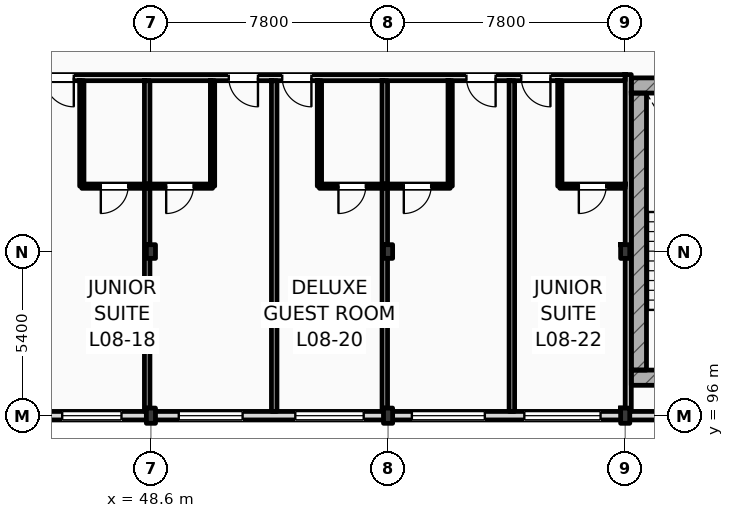
"""IFC4 building model, lengths in metres.
Left out: names, types, materials, properties, quantities, classifications, styles, units other than length and angle.
Written with IfcOpenShell. Run it as: python <this file> out.ifc"""

import sys

from ifc_helpers import new_model, si_unit, direction, frame, frame_2d, origin, origin_2d, place, context, subcontext, project, spatial, rectangle, i_section, extrude, element, fill, save


model = new_model("IFC4")
c1 = context("Model", 3, precision=1e-05, world=origin(), true_north=direction((0.0, 1.0)))
c2 = subcontext(c1, "Body", "Model", "MODEL_VIEW")
j1 = project(units=[si_unit("LENGTHUNIT", "METRE"), si_unit("PLANEANGLEUNIT", "RADIAN")], contexts=[c1])
p1 = place(None, origin())
s1 = spatial("IfcSite", under=j1, at=p1, CompositionType="ELEMENT")
p2 = place(p1, origin())
s2 = spatial("IfcBuilding", under=s1, at=p2, CompositionType="ELEMENT")
p3 = place(p2, frame((0.0, 0.0, 35.4)))
s3 = spatial("IfcBuildingStorey", under=s2, at=p3, CompositionType="ELEMENT", Elevation=35.4)
p4 = place(p3, frame((48.6, 96.0, 0.0), z_axis=(0.0, 0.0, 1.0), x_axis=(1.0, 0.0, 0.0)))
e1 = element("IfcColumn", 1, at=p4, inside=s3, PredefinedType="COLUMN", context=c2, shape_type="SweptSolid", body=[
    extrude(i_section(OverallWidth=0.3, OverallDepth=0.5, WebThickness=0.014, FlangeThickness=0.028, FilletRadius=0.027, at=origin_2d()), origin(), (0.0, 0.0, 1.0), 3.6),
])
p5 = place(p3, frame((48.6, 101.4, 0.0), z_axis=(0.0, 0.0, 1.0), x_axis=(1.0, 0.0, 0.0)))
e2 = element("IfcColumn", 2, at=p5, inside=s3, PredefinedType="COLUMN", context=c2, shape_type="SweptSolid", body=[
    extrude(i_section(OverallWidth=0.3, OverallDepth=0.45, WebThickness=0.014, FlangeThickness=0.026, FilletRadius=0.027, at=origin_2d()), origin(), (0.0, 0.0, 1.0), 3.6),
])
p6 = place(p3, frame((56.4, 96.0, 0.0), z_axis=(0.0, 0.0, 1.0), x_axis=(1.0, 0.0, 0.0)))
e3 = element("IfcColumn", 3, at=p6, inside=s3, PredefinedType="COLUMN", context=c2, shape_type="SweptSolid", body=[
    extrude(i_section(OverallWidth=0.3, OverallDepth=0.5, WebThickness=0.014, FlangeThickness=0.028, FilletRadius=0.027, at=origin_2d()), origin(), (0.0, 0.0, 1.0), 3.6),
])
p7 = place(p3, frame((56.4, 101.4, 0.0), z_axis=(0.0, 0.0, 1.0), x_axis=(1.0, 0.0, 0.0)))
e4 = element("IfcColumn", 4, at=p7, inside=s3, PredefinedType="COLUMN", context=c2, shape_type="SweptSolid", body=[
    extrude(i_section(OverallWidth=0.3, OverallDepth=0.45, WebThickness=0.014, FlangeThickness=0.026, FilletRadius=0.027, at=origin_2d()), origin(), (0.0, 0.0, 1.0), 3.6),
])
p8 = place(p3, frame((64.2, 96.0, 0.0), z_axis=(0.0, 0.0, 1.0), x_axis=(1.0, 0.0, 0.0)))
e5 = element("IfcColumn", 5, at=p8, inside=s3, PredefinedType="COLUMN", context=c2, shape_type="SweptSolid", body=[
    extrude(i_section(OverallWidth=0.3, OverallDepth=0.5, WebThickness=0.014, FlangeThickness=0.028, FilletRadius=0.027, at=origin_2d()), origin(), (0.0, 0.0, 1.0), 3.6),
])
p9 = place(p3, frame((64.2, 101.4, 0.0), z_axis=(0.0, 0.0, 1.0), x_axis=(1.0, 0.0, 0.0)))
e6 = element("IfcColumn", 6, at=p9, inside=s3, PredefinedType="COLUMN", context=c2, shape_type="SweptSolid", body=[
    extrude(i_section(OverallWidth=0.3, OverallDepth=0.45, WebThickness=0.014, FlangeThickness=0.026, FilletRadius=0.027, at=origin_2d()), origin(), (0.0, 0.0, 1.0), 3.6),
])
for number, where, z_axis, x_axis in (
    (7, (64.4, 106.862, 0.0), (0.0, 0.0, 1.0), (1.0, 0.0, 0.0)),
    (8, (64.4, 97.25, 0.0), (0.0, 0.0, 1.0), (1.0, 0.0, 0.0)),
):
    element("IfcWall", number, at=place(p3, frame(where, z_axis=z_axis, x_axis=x_axis)), inside=s3, PredefinedType="SHEAR", context=c2, shape_type="SweptSolid", body=[
        extrude(rectangle(XDim=5.16, YDim=0.5, at=frame_2d((2.58, 0.0))), origin(), (0.0, 0.0, 1.0), 3.6),
    ])
p10 = place(p3, frame((64.65, 97.5, 0.0), z_axis=(0.0, 0.0, 1.0), x_axis=(0.0, 1.0, 0.0)))
e9 = element("IfcWall", 9, at=p10, inside=s3, PredefinedType="SHEAR", context=c2, shape_type="SweptSolid", body=[
    extrude(rectangle(XDim=9.112, YDim=0.5, at=frame_2d((4.556, 0.0))), origin(), (0.0, 0.0, 1.0), 3.6),
])
p11 = place(p3, frame((25.2, 96.0, 0.0), z_axis=(0.0, 0.0, 1.0), x_axis=(1.0, 0.0, 0.0)))
e10 = element("IfcWall", 10, at=p11, inside=s3, PredefinedType="STANDARD", context=c2, shape_type="SweptSolid", body=[
    extrude(rectangle(XDim=70.2, YDim=0.28, at=frame_2d((35.1, 0.0))), origin(), (0.0, 0.0, 1.0), 2.92),
])
p12 = place(p11, frame((16.694, 0.0, 0.9)))
e11 = element("IfcOpeningElement", 11, at=p12, cuts=e10, PredefinedType="OPENING", context=c2, shape_type="SweptSolid", body=[
    extrude(rectangle(XDim=1.8, YDim=1.84, at=frame_2d((0.9, 0.92))), frame((0.0, 0.15, 0.0), z_axis=(0.0, -1.0, 0.0), x_axis=(1.0, 0.0, 0.0)), (0.0, 0.0, 1.0), 0.3),
])
p13 = place(p11, frame((20.482, 0.0, 0.9)))
e12 = element("IfcOpeningElement", 12, at=p13, cuts=e10, PredefinedType="OPENING", context=c2, shape_type="SweptSolid", body=[
    extrude(rectangle(XDim=1.95, YDim=1.84, at=frame_2d((0.975, 0.92))), frame((0.0, 0.15, 0.0), z_axis=(0.0, -1.0, 0.0), x_axis=(1.0, 0.0, 0.0)), (0.0, 0.0, 1.0), 0.3),
])
p14 = place(p11, frame((24.316, 0.0, 0.9)))
e13 = element("IfcOpeningElement", 13, at=p14, cuts=e10, PredefinedType="OPENING", context=c2, shape_type="SweptSolid", body=[
    extrude(rectangle(XDim=2.1, YDim=1.84, at=frame_2d((1.05, 0.92))), frame((0.0, 0.15, 0.0), z_axis=(0.0, -1.0, 0.0), x_axis=(1.0, 0.0, 0.0)), (0.0, 0.0, 1.0), 0.3),
])
p15 = place(p11, frame((28.149, 0.0, 0.9)))
e14 = element("IfcOpeningElement", 14, at=p15, cuts=e10, PredefinedType="OPENING", context=c2, shape_type="SweptSolid", body=[
    extrude(rectangle(XDim=2.25, YDim=1.84, at=frame_2d((1.125, 0.92))), frame((0.0, 0.15, 0.0), z_axis=(0.0, -1.0, 0.0), x_axis=(1.0, 0.0, 0.0)), (0.0, 0.0, 1.0), 0.3),
])
p16 = place(p11, frame((31.983, 0.0, 0.9)))
e15 = element("IfcOpeningElement", 15, at=p16, cuts=e10, PredefinedType="OPENING", context=c2, shape_type="SweptSolid", body=[
    extrude(rectangle(XDim=2.4, YDim=1.84, at=frame_2d((1.2, 0.92))), frame((0.0, 0.15, 0.0), z_axis=(0.0, -1.0, 0.0), x_axis=(1.0, 0.0, 0.0)), (0.0, 0.0, 1.0), 0.3),
])
p17 = place(p11, frame((35.682, 0.0, 0.9)))
e16 = element("IfcOpeningElement", 16, at=p17, cuts=e10, PredefinedType="OPENING", context=c2, shape_type="SweptSolid", body=[
    extrude(rectangle(XDim=2.508, YDim=1.84, at=frame_2d((1.254, 0.92))), frame((0.0, 0.15, 0.0), z_axis=(0.0, -1.0, 0.0), x_axis=(1.0, 0.0, 0.0)), (0.0, 0.0, 1.0), 0.3),
])
p18 = place(p11, frame((55.56, 0.0, 0.9)))
e17 = element("IfcOpeningElement", 17, at=p18, cuts=e10, PredefinedType="OPENING", context=c2, shape_type="SweptSolid", body=[
    extrude(rectangle(XDim=1.8, YDim=1.84, at=frame_2d((0.9, 0.92))), frame((0.0, 0.15, 0.0), z_axis=(0.0, -1.0, 0.0), x_axis=(1.0, 0.0, 0.0)), (0.0, 0.0, 1.0), 0.3),
])
p19 = place(p11, frame((58.628, 0.0, 0.9)))
e18 = element("IfcOpeningElement", 18, at=p19, cuts=e10, PredefinedType="OPENING", context=c2, shape_type="SweptSolid", body=[
    extrude(rectangle(XDim=2.809, YDim=1.84, at=frame_2d((1.405, 0.92))), frame((0.0, 0.15, 0.0), z_axis=(0.0, -1.0, 0.0), x_axis=(1.0, 0.0, 0.0)), (0.0, 0.0, 1.0), 0.3),
])
p20 = place(p11, frame((63.257, 0.0, 0.9)))
e19 = element("IfcOpeningElement", 19, at=p20, cuts=e10, PredefinedType="OPENING", context=c2, shape_type="SweptSolid", body=[
    extrude(rectangle(XDim=1.8, YDim=1.84, at=frame_2d((0.9, 0.92))), frame((0.0, 0.15, 0.0), z_axis=(0.0, -1.0, 0.0), x_axis=(1.0, 0.0, 0.0)), (0.0, 0.0, 1.0), 0.3),
])
p21 = place(p11, frame((66.453, 0.0, 0.9)))
e20 = element("IfcOpeningElement", 20, at=p21, cuts=e10, PredefinedType="OPENING", context=c2, shape_type="SweptSolid", body=[
    extrude(rectangle(XDim=2.737, YDim=1.84, at=frame_2d((1.369, 0.92))), frame((0.0, 0.15, 0.0), z_axis=(0.0, -1.0, 0.0), x_axis=(1.0, 0.0, 0.0)), (0.0, 0.0, 1.0), 0.3),
])
p22 = place(p3, frame((40.76, 107.12, 0.0), z_axis=(0.0, 0.0, 1.0), x_axis=(1.0, 0.0, 0.0)))
e21 = element("IfcWall", 21, at=p22, inside=s3, PredefinedType="PARTITIONING", context=c2, shape_type="SweptSolid", body=[
    extrude(rectangle(XDim=23.44, YDim=0.2, at=frame_2d((11.72, 0.0))), origin(), (0.0, 0.0, 1.0), 3.38),
])
p23 = place(p22, frame((2.629, 0.0, 0.0)))
e22 = element("IfcOpeningElement", 22, at=p23, cuts=e21, PredefinedType="OPENING", context=c2, shape_type="SweptSolid", body=[
    extrude(rectangle(XDim=0.96, YDim=2.2, at=frame_2d((0.48, 1.1))), frame((0.0, 0.11, 0.0), z_axis=(0.0, -1.0, 0.0), x_axis=(1.0, 0.0, 0.0)), (0.0, 0.0, 1.0), 0.22),
])
p24 = place(p22, frame((4.343, 0.0, 0.0)))
e23 = element("IfcOpeningElement", 23, at=p24, cuts=e21, PredefinedType="OPENING", context=c2, shape_type="SweptSolid", body=[
    extrude(rectangle(XDim=0.96, YDim=2.2, at=frame_2d((0.48, 1.1))), frame((0.0, 0.11, 0.0), z_axis=(0.0, -1.0, 0.0), x_axis=(1.0, 0.0, 0.0)), (0.0, 0.0, 1.0), 0.22),
])
p25 = place(p22, frame((10.401, 0.0, 0.0)))
e24 = element("IfcOpeningElement", 24, at=p25, cuts=e21, PredefinedType="OPENING", context=c2, shape_type="SweptSolid", body=[
    extrude(rectangle(XDim=0.96, YDim=2.2, at=frame_2d((0.48, 1.1))), frame((0.0, 0.11, 0.0), z_axis=(0.0, -1.0, 0.0), x_axis=(1.0, 0.0, 0.0)), (0.0, 0.0, 1.0), 0.22),
])
p26 = place(p22, frame((12.159, 0.0, 0.0)))
e25 = element("IfcOpeningElement", 25, at=p26, cuts=e21, PredefinedType="OPENING", context=c2, shape_type="SweptSolid", body=[
    extrude(rectangle(XDim=0.96, YDim=2.2, at=frame_2d((0.48, 1.1))), frame((0.0, 0.11, 0.0), z_axis=(0.0, -1.0, 0.0), x_axis=(1.0, 0.0, 0.0)), (0.0, 0.0, 1.0), 0.22),
])
p27 = place(p22, frame((18.218, 0.0, 0.0)))
e26 = element("IfcOpeningElement", 26, at=p27, cuts=e21, PredefinedType="OPENING", context=c2, shape_type="SweptSolid", body=[
    extrude(rectangle(XDim=0.96, YDim=2.2, at=frame_2d((0.48, 1.1))), frame((0.0, 0.11, 0.0), z_axis=(0.0, -1.0, 0.0), x_axis=(1.0, 0.0, 0.0)), (0.0, 0.0, 1.0), 0.22),
])
p28 = place(p22, frame((20.021, 0.0, 0.0)))
e27 = element("IfcOpeningElement", 27, at=p28, cuts=e21, PredefinedType="OPENING", context=c2, shape_type="SweptSolid", body=[
    extrude(rectangle(XDim=0.96, YDim=2.2, at=frame_2d((0.48, 1.1))), frame((0.0, 0.11, 0.0), z_axis=(0.0, -1.0, 0.0), x_axis=(1.0, 0.0, 0.0)), (0.0, 0.0, 1.0), 0.22),
])
p29 = place(p3, frame((64.3, 96.14, 0.0), z_axis=(0.0, 0.0, 1.0), x_axis=(0.0, 1.0, 0.0)))
e28 = element("IfcWall", 28, at=p29, inside=s3, PredefinedType="PARTITIONING", context=c2, shape_type="SweptSolid", body=[
    extrude(rectangle(XDim=11.08, YDim=0.2, at=frame_2d((5.54, 0.0))), origin(), (0.0, 0.0, 1.0), 3.01),
])
p30 = place(p3, frame((48.477, 96.14, 0.0), z_axis=(0.0, 0.0, 1.0), x_axis=(0.0, 1.0, 0.0)))
e29 = element("IfcWall", 29, at=p30, inside=s3, PredefinedType="PARTITIONING", context=c2, shape_type="SweptSolid", body=[
    extrude(rectangle(XDim=10.88, YDim=0.18, at=frame_2d((5.44, 0.0))), origin(), (0.0, 0.0, 1.0), 3.01),
])
p31 = place(p3, frame((46.327, 103.55, 0.0), z_axis=(0.0, 0.0, 1.0), x_axis=(0.0, 1.0, 0.0)))
e30 = element("IfcWall", 30, at=p31, inside=s3, PredefinedType="PARTITIONING", context=c2, shape_type="SweptSolid", body=[
    extrude(rectangle(XDim=3.47, YDim=0.14, at=frame_2d((1.735, 0.0))), origin(), (0.0, 0.0, 1.0), 3.38),
])
p32 = place(p3, frame((46.327, 103.55, 0.0), z_axis=(0.0, 0.0, 1.0), x_axis=(1.0, 0.0, 0.0)))
e31 = element("IfcWall", 31, at=p32, inside=s3, PredefinedType="PARTITIONING", context=c2, shape_type="SweptSolid", body=[
    extrude(rectangle(XDim=2.15, YDim=0.14, at=frame_2d((1.075, 0.0))), origin(), (0.0, 0.0, 1.0), 3.38),
])
p33 = place(p32, frame((0.625, 0.0, 0.0)))
e32 = element("IfcOpeningElement", 32, at=p33, cuts=e31, PredefinedType="OPENING", context=c2, shape_type="SweptSolid", body=[
    extrude(rectangle(XDim=0.9, YDim=2.1, at=frame_2d((0.45, 1.05))), frame((0.0, 0.08, 0.0), z_axis=(0.0, -1.0, 0.0), x_axis=(1.0, 0.0, 0.0)), (0.0, 0.0, 1.0), 0.16),
])
p34 = place(p3, frame((52.655, 96.14, 0.0), z_axis=(0.0, 0.0, 1.0), x_axis=(0.0, 1.0, 0.0)))
e33 = element("IfcWall", 33, at=p34, inside=s3, PredefinedType="PARTITIONING", context=c2, shape_type="SweptSolid", body=[
    extrude(rectangle(XDim=10.88, YDim=0.18, at=frame_2d((5.44, 0.0))), origin(), (0.0, 0.0, 1.0), 3.38),
])
p35 = place(p3, frame((50.627, 103.55, 0.0), z_axis=(0.0, 0.0, 1.0), x_axis=(0.0, 1.0, 0.0)))
e34 = element("IfcWall", 34, at=p35, inside=s3, PredefinedType="PARTITIONING", context=c2, shape_type="SweptSolid", body=[
    extrude(rectangle(XDim=3.47, YDim=0.14, at=frame_2d((1.735, 0.0))), origin(), (0.0, 0.0, 1.0), 3.38),
])
p36 = place(p3, frame((48.477, 103.55, 0.0), z_axis=(0.0, 0.0, 1.0), x_axis=(1.0, 0.0, 0.0)))
e35 = element("IfcWall", 35, at=p36, inside=s3, PredefinedType="PARTITIONING", context=c2, shape_type="SweptSolid", body=[
    extrude(rectangle(XDim=2.15, YDim=0.14, at=frame_2d((1.075, 0.0))), origin(), (0.0, 0.0, 1.0), 3.38),
])
p37 = place(p36, frame((0.625, 0.0, 0.0)))
e36 = element("IfcOpeningElement", 36, at=p37, cuts=e35, PredefinedType="OPENING", context=c2, shape_type="SweptSolid", body=[
    extrude(rectangle(XDim=0.9, YDim=2.1, at=frame_2d((0.45, 1.05))), frame((0.0, 0.08, 0.0), z_axis=(0.0, -1.0, 0.0), x_axis=(1.0, 0.0, 0.0)), (0.0, 0.0, 1.0), 0.16),
])
p38 = place(p3, frame((56.293, 96.14, 0.0), z_axis=(0.0, 0.0, 1.0), x_axis=(0.0, 1.0, 0.0)))
e37 = element("IfcWall", 37, at=p38, inside=s3, PredefinedType="PARTITIONING", context=c2, shape_type="SweptSolid", body=[
    extrude(rectangle(XDim=10.88, YDim=0.18, at=frame_2d((5.44, 0.0))), origin(), (0.0, 0.0, 1.0), 3.01),
])
p39 = place(p3, frame((54.143, 103.55, 0.0), z_axis=(0.0, 0.0, 1.0), x_axis=(0.0, 1.0, 0.0)))
e38 = element("IfcWall", 38, at=p39, inside=s3, PredefinedType="PARTITIONING", context=c2, shape_type="SweptSolid", body=[
    extrude(rectangle(XDim=3.47, YDim=0.14, at=frame_2d((1.735, 0.0))), origin(), (0.0, 0.0, 1.0), 3.38),
])
p40 = place(p3, frame((54.143, 103.55, 0.0), z_axis=(0.0, 0.0, 1.0), x_axis=(1.0, 0.0, 0.0)))
e39 = element("IfcWall", 39, at=p40, inside=s3, PredefinedType="PARTITIONING", context=c2, shape_type="SweptSolid", body=[
    extrude(rectangle(XDim=2.15, YDim=0.14, at=frame_2d((1.075, 0.0))), origin(), (0.0, 0.0, 1.0), 3.38),
])
p41 = place(p40, frame((0.625, 0.0, 0.0)))
e40 = element("IfcOpeningElement", 40, at=p41, cuts=e39, PredefinedType="OPENING", context=c2, shape_type="SweptSolid", body=[
    extrude(rectangle(XDim=0.9, YDim=2.1, at=frame_2d((0.45, 1.05))), frame((0.0, 0.08, 0.0), z_axis=(0.0, -1.0, 0.0), x_axis=(1.0, 0.0, 0.0)), (0.0, 0.0, 1.0), 0.16),
])
p42 = place(p3, frame((60.472, 96.14, 0.0), z_axis=(0.0, 0.0, 1.0), x_axis=(0.0, 1.0, 0.0)))
e41 = element("IfcWall", 41, at=p42, inside=s3, PredefinedType="PARTITIONING", context=c2, shape_type="SweptSolid", body=[
    extrude(rectangle(XDim=10.88, YDim=0.18, at=frame_2d((5.44, 0.0))), origin(), (0.0, 0.0, 1.0), 3.38),
])
p43 = place(p3, frame((58.443, 103.55, 0.0), z_axis=(0.0, 0.0, 1.0), x_axis=(0.0, 1.0, 0.0)))
e42 = element("IfcWall", 42, at=p43, inside=s3, PredefinedType="PARTITIONING", context=c2, shape_type="SweptSolid", body=[
    extrude(rectangle(XDim=3.47, YDim=0.14, at=frame_2d((1.735, 0.0))), origin(), (0.0, 0.0, 1.0), 3.38),
])
p44 = place(p3, frame((56.293, 103.55, 0.0), z_axis=(0.0, 0.0, 1.0), x_axis=(1.0, 0.0, 0.0)))
e43 = element("IfcWall", 43, at=p44, inside=s3, PredefinedType="PARTITIONING", context=c2, shape_type="SweptSolid", body=[
    extrude(rectangle(XDim=2.15, YDim=0.14, at=frame_2d((1.075, 0.0))), origin(), (0.0, 0.0, 1.0), 3.38),
])
p45 = place(p44, frame((0.625, 0.0, 0.0)))
e44 = element("IfcOpeningElement", 44, at=p45, cuts=e43, PredefinedType="OPENING", context=c2, shape_type="SweptSolid", body=[
    extrude(rectangle(XDim=0.9, YDim=2.1, at=frame_2d((0.45, 1.05))), frame((0.0, 0.08, 0.0), z_axis=(0.0, -1.0, 0.0), x_axis=(1.0, 0.0, 0.0)), (0.0, 0.0, 1.0), 0.16),
])
p46 = place(p3, frame((62.05, 103.55, 0.0), z_axis=(0.0, 0.0, 1.0), x_axis=(0.0, 1.0, 0.0)))
e45 = element("IfcWall", 45, at=p46, inside=s3, PredefinedType="PARTITIONING", context=c2, shape_type="SweptSolid", body=[
    extrude(rectangle(XDim=3.47, YDim=0.14, at=frame_2d((1.735, 0.0))), origin(), (0.0, 0.0, 1.0), 3.38),
])
p47 = place(p3, frame((62.05, 103.55, 0.0), z_axis=(0.0, 0.0, 1.0), x_axis=(1.0, 0.0, 0.0)))
e46 = element("IfcWall", 46, at=p47, inside=s3, PredefinedType="PARTITIONING", context=c2, shape_type="SweptSolid", body=[
    extrude(rectangle(XDim=2.15, YDim=0.14, at=frame_2d((1.075, 0.0))), origin(), (0.0, 0.0, 1.0), 3.38),
])
p48 = place(p47, frame((0.625, 0.0, 0.0)))
e47 = element("IfcOpeningElement", 47, at=p48, cuts=e46, PredefinedType="OPENING", context=c2, shape_type="SweptSolid", body=[
    extrude(rectangle(XDim=0.9, YDim=2.1, at=frame_2d((0.45, 1.05))), frame((0.0, 0.08, 0.0), z_axis=(0.0, -1.0, 0.0), x_axis=(1.0, 0.0, 0.0)), (0.0, 0.0, 1.0), 0.16),
])
p49 = place(p13, origin())
e48 = element("IfcWindow", 48, at=p49, inside=s3, PartitioningType="DOUBLE_PANEL_VERTICAL", PredefinedType="WINDOW", context=c2, shape_type="SweptSolid", body=[
    extrude(rectangle(XDim=1.95, YDim=1.84, at=frame_2d((0.975, 0.92))), frame((0.0, 0.03, 0.0), z_axis=(0.0, -1.0, 0.0), x_axis=(1.0, 0.0, 0.0)), (0.0, 0.0, 1.0), 0.06),
])
fill(e12, e48)
p50 = place(p14, origin())
e49 = element("IfcWindow", 49, at=p50, inside=s3, PartitioningType="DOUBLE_PANEL_VERTICAL", PredefinedType="WINDOW", context=c2, shape_type="SweptSolid", body=[
    extrude(rectangle(XDim=2.1, YDim=1.84, at=frame_2d((1.05, 0.92))), frame((0.0, 0.03, 0.0), z_axis=(0.0, -1.0, 0.0), x_axis=(1.0, 0.0, 0.0)), (0.0, 0.0, 1.0), 0.06),
])
fill(e13, e49)
p51 = place(p15, origin())
e50 = element("IfcWindow", 50, at=p51, inside=s3, PartitioningType="DOUBLE_PANEL_VERTICAL", PredefinedType="WINDOW", context=c2, shape_type="SweptSolid", body=[
    extrude(rectangle(XDim=2.25, YDim=1.84, at=frame_2d((1.125, 0.92))), frame((0.0, 0.03, 0.0), z_axis=(0.0, -1.0, 0.0), x_axis=(1.0, 0.0, 0.0)), (0.0, 0.0, 1.0), 0.06),
])
fill(e14, e50)
p52 = place(p16, origin())
e51 = element("IfcWindow", 51, at=p52, inside=s3, PartitioningType="DOUBLE_PANEL_VERTICAL", PredefinedType="WINDOW", context=c2, shape_type="SweptSolid", body=[
    extrude(rectangle(XDim=2.4, YDim=1.84, at=frame_2d((1.2, 0.92))), frame((0.0, 0.03, 0.0), z_axis=(0.0, -1.0, 0.0), x_axis=(1.0, 0.0, 0.0)), (0.0, 0.0, 1.0), 0.06),
])
fill(e15, e51)
p53 = place(p17, origin())
e52 = element("IfcWindow", 52, at=p53, inside=s3, PartitioningType="DOUBLE_PANEL_VERTICAL", PredefinedType="WINDOW", context=c2, shape_type="SweptSolid", body=[
    extrude(rectangle(XDim=2.508, YDim=1.84, at=frame_2d((1.254, 0.92))), frame((0.0, 0.03, 0.0), z_axis=(0.0, -1.0, 0.0), x_axis=(1.0, 0.0, 0.0)), (0.0, 0.0, 1.0), 0.06),
])
fill(e16, e52)
p54 = place(p24, frame((0.96, 0.0, 0.0), z_axis=(0.0, 0.0, 1.0), x_axis=(-1.0, 0.0, 0.0)))
e53 = element("IfcDoor", 53, at=p54, inside=s3, OperationType="SINGLE_SWING_RIGHT", PredefinedType="DOOR", context=c2, shape_type="SweptSolid", body=[
    extrude(rectangle(XDim=0.96, YDim=2.2, at=frame_2d((0.48, 1.1))), frame((0.0, 0.025, 0.0), z_axis=(0.0, -1.0, 0.0), x_axis=(1.0, 0.0, 0.0)), (0.0, 0.0, 1.0), 0.05),
])
fill(e23, e53)
p55 = place(p33, frame((0.9, 0.0, 0.0), z_axis=(0.0, 0.0, 1.0), x_axis=(-1.0, 0.0, 0.0)))
e54 = element("IfcDoor", 54, at=p55, inside=s3, OperationType="SINGLE_SWING_LEFT", PredefinedType="DOOR", context=c2, shape_type="SweptSolid", body=[
    extrude(rectangle(XDim=0.9, YDim=2.1, at=frame_2d((0.45, 1.05))), frame((0.0, 0.025, 0.0), z_axis=(0.0, -1.0, 0.0), x_axis=(1.0, 0.0, 0.0)), (0.0, 0.0, 1.0), 0.05),
])
fill(e32, e54)
p56 = place(p25, frame((0.96, 0.0, 0.0), z_axis=(0.0, 0.0, 1.0), x_axis=(-1.0, 0.0, 0.0)))
e55 = element("IfcDoor", 55, at=p56, inside=s3, OperationType="SINGLE_SWING_RIGHT", PredefinedType="DOOR", context=c2, shape_type="SweptSolid", body=[
    extrude(rectangle(XDim=0.96, YDim=2.2, at=frame_2d((0.48, 1.1))), frame((0.0, 0.025, 0.0), z_axis=(0.0, -1.0, 0.0), x_axis=(1.0, 0.0, 0.0)), (0.0, 0.0, 1.0), 0.05),
])
fill(e24, e55)
p57 = place(p37, frame((0.9, 0.0, 0.0), z_axis=(0.0, 0.0, 1.0), x_axis=(-1.0, 0.0, 0.0)))
e56 = element("IfcDoor", 56, at=p57, inside=s3, OperationType="SINGLE_SWING_LEFT", PredefinedType="DOOR", context=c2, shape_type="SweptSolid", body=[
    extrude(rectangle(XDim=0.9, YDim=2.1, at=frame_2d((0.45, 1.05))), frame((0.0, 0.025, 0.0), z_axis=(0.0, -1.0, 0.0), x_axis=(1.0, 0.0, 0.0)), (0.0, 0.0, 1.0), 0.05),
])
fill(e36, e56)
p58 = place(p26, frame((0.96, 0.0, 0.0), z_axis=(0.0, 0.0, 1.0), x_axis=(-1.0, 0.0, 0.0)))
e57 = element("IfcDoor", 57, at=p58, inside=s3, OperationType="SINGLE_SWING_RIGHT", PredefinedType="DOOR", context=c2, shape_type="SweptSolid", body=[
    extrude(rectangle(XDim=0.96, YDim=2.2, at=frame_2d((0.48, 1.1))), frame((0.0, 0.025, 0.0), z_axis=(0.0, -1.0, 0.0), x_axis=(1.0, 0.0, 0.0)), (0.0, 0.0, 1.0), 0.05),
])
fill(e25, e57)
p59 = place(p41, frame((0.9, 0.0, 0.0), z_axis=(0.0, 0.0, 1.0), x_axis=(-1.0, 0.0, 0.0)))
e58 = element("IfcDoor", 58, at=p59, inside=s3, OperationType="SINGLE_SWING_LEFT", PredefinedType="DOOR", context=c2, shape_type="SweptSolid", body=[
    extrude(rectangle(XDim=0.9, YDim=2.1, at=frame_2d((0.45, 1.05))), frame((0.0, 0.025, 0.0), z_axis=(0.0, -1.0, 0.0), x_axis=(1.0, 0.0, 0.0)), (0.0, 0.0, 1.0), 0.05),
])
fill(e40, e58)
p60 = place(p27, frame((0.96, 0.0, 0.0), z_axis=(0.0, 0.0, 1.0), x_axis=(-1.0, 0.0, 0.0)))
e59 = element("IfcDoor", 59, at=p60, inside=s3, OperationType="SINGLE_SWING_RIGHT", PredefinedType="DOOR", context=c2, shape_type="SweptSolid", body=[
    extrude(rectangle(XDim=0.96, YDim=2.2, at=frame_2d((0.48, 1.1))), frame((0.0, 0.025, 0.0), z_axis=(0.0, -1.0, 0.0), x_axis=(1.0, 0.0, 0.0)), (0.0, 0.0, 1.0), 0.05),
])
fill(e26, e59)
p61 = place(p45, frame((0.9, 0.0, 0.0), z_axis=(0.0, 0.0, 1.0), x_axis=(-1.0, 0.0, 0.0)))
e60 = element("IfcDoor", 60, at=p61, inside=s3, OperationType="SINGLE_SWING_LEFT", PredefinedType="DOOR", context=c2, shape_type="SweptSolid", body=[
    extrude(rectangle(XDim=0.9, YDim=2.1, at=frame_2d((0.45, 1.05))), frame((0.0, 0.025, 0.0), z_axis=(0.0, -1.0, 0.0), x_axis=(1.0, 0.0, 0.0)), (0.0, 0.0, 1.0), 0.05),
])
fill(e44, e60)
p62 = place(p28, frame((0.96, 0.0, 0.0), z_axis=(0.0, 0.0, 1.0), x_axis=(-1.0, 0.0, 0.0)))
e61 = element("IfcDoor", 61, at=p62, inside=s3, OperationType="SINGLE_SWING_RIGHT", PredefinedType="DOOR", context=c2, shape_type="SweptSolid", body=[
    extrude(rectangle(XDim=0.96, YDim=2.2, at=frame_2d((0.48, 1.1))), frame((0.0, 0.025, 0.0), z_axis=(0.0, -1.0, 0.0), x_axis=(1.0, 0.0, 0.0)), (0.0, 0.0, 1.0), 0.05),
])
fill(e27, e61)
p63 = place(p48, frame((0.9, 0.0, 0.0), z_axis=(0.0, 0.0, 1.0), x_axis=(-1.0, 0.0, 0.0)))
e62 = element("IfcDoor", 62, at=p63, inside=s3, OperationType="SINGLE_SWING_LEFT", PredefinedType="DOOR", context=c2, shape_type="SweptSolid", body=[
    extrude(rectangle(XDim=0.9, YDim=2.1, at=frame_2d((0.45, 1.05))), frame((0.0, 0.025, 0.0), z_axis=(0.0, -1.0, 0.0), x_axis=(1.0, 0.0, 0.0)), (0.0, 0.0, 1.0), 0.05),
])
fill(e47, e62)
save(model, sys.argv[1])
